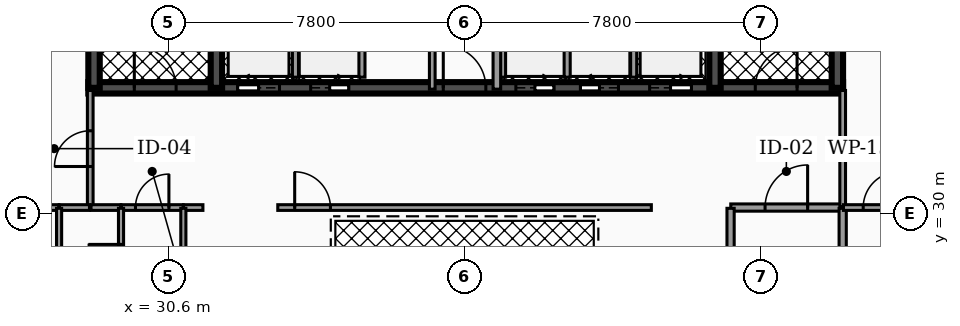
"""IFC4 building model, lengths in metres.
Left out: names, types, materials, properties, quantities, classifications, styles, units other than length and angle.
Written with IfcOpenShell. Run it as: python <this file> out.ifc"""

import sys

from ifc_helpers import new_model, si_unit, direction, frame, frame_2d, origin, place, context, subcontext, project, spatial, rectangle, extrude, element, fill, save


model = new_model("IFC4")
c1 = context("Model", 3, precision=1e-05, world=origin(), true_north=direction((0.0, 1.0)))
c2 = subcontext(c1, "Body", "Model", "MODEL_VIEW")
j1 = project(units=[si_unit("LENGTHUNIT", "METRE"), si_unit("PLANEANGLEUNIT", "RADIAN")], contexts=[c1])
p1 = place(None, origin())
s1 = spatial("IfcSite", under=j1, at=p1, CompositionType="ELEMENT")
p2 = place(p1, origin())
s2 = spatial("IfcBuilding", under=s1, at=p2, CompositionType="ELEMENT")
p3 = place(p2, frame((0.0, 0.0, 208.76)))
s3 = spatial("IfcBuildingStorey", under=s2, at=p3, CompositionType="ELEMENT", Elevation=208.76)
p4 = place(p3, frame((28.5, 33.3, 0.0), z_axis=(0.0, 0.0, 1.0), x_axis=(1.0, 0.0, 0.0)))
e1 = element("IfcWall", 1, at=p4, inside=s3, PredefinedType="SHEAR", context=c2, shape_type="SweptSolid", body=[
    extrude(rectangle(XDim=19.86, YDim=0.3, at=frame_2d((9.93, 0.0))), origin(), (0.0, 0.0, 1.0), 3.18),
])
p5 = place(p4, frame((3.93, 0.0, 0.0)))
e2 = element("IfcOpeningElement", 2, at=p5, cuts=e1, PredefinedType="OPENING", context=c2, shape_type="SweptSolid", body=[
    extrude(rectangle(XDim=1.1, YDim=2.15, at=frame_2d((0.55, 1.075))), frame((0.0, 0.16, 0.0), z_axis=(0.0, -1.0, 0.0), x_axis=(1.0, 0.0, 0.0)), (0.0, 0.0, 1.0), 0.32),
])
p6 = place(p4, frame((14.77, 0.0, 0.0)))
e3 = element("IfcOpeningElement", 3, at=p6, cuts=e1, PredefinedType="OPENING", context=c2, shape_type="SweptSolid", body=[
    extrude(rectangle(XDim=1.1, YDim=2.15, at=frame_2d((0.55, 1.075))), frame((0.0, 0.16, 0.0), z_axis=(0.0, -1.0, 0.0), x_axis=(1.0, 0.0, 0.0)), (0.0, 0.0, 1.0), 0.32),
])
p7 = place(p4, frame((11.25, 0.0, 0.0)))
e4 = element("IfcOpeningElement", 4, at=p7, cuts=e1, PredefinedType="OPENING", context=c2, shape_type="SweptSolid", body=[
    extrude(rectangle(XDim=1.0, YDim=2.1, at=frame_2d((0.5, 1.05))), frame((0.0, 0.16, 0.0), z_axis=(0.0, -1.0, 0.0), x_axis=(1.0, 0.0, 0.0)), (0.0, 0.0, 1.0), 0.32),
])
p8 = place(p4, frame((12.95, 0.0, 0.0)))
e5 = element("IfcOpeningElement", 5, at=p8, cuts=e1, PredefinedType="OPENING", context=c2, shape_type="SweptSolid", body=[
    extrude(rectangle(XDim=1.0, YDim=2.1, at=frame_2d((0.5, 1.05))), frame((0.0, 0.16, 0.0), z_axis=(0.0, -1.0, 0.0), x_axis=(1.0, 0.0, 0.0)), (0.0, 0.0, 1.0), 0.32),
])
p9 = place(p4, frame((5.85, 0.0, 0.0)))
e6 = element("IfcOpeningElement", 6, at=p9, cuts=e1, PredefinedType="OPENING", context=c2, shape_type="SweptSolid", body=[
    extrude(rectangle(XDim=1.0, YDim=2.1, at=frame_2d((0.5, 1.05))), frame((0.0, 0.16, 0.0), z_axis=(0.0, -1.0, 0.0), x_axis=(1.0, 0.0, 0.0)), (0.0, 0.0, 1.0), 0.32),
])
p10 = place(p4, frame((1.21, 0.0, 0.0)))
e7 = element("IfcOpeningElement", 7, at=p10, cuts=e1, PredefinedType="OPENING", context=c2, shape_type="SweptSolid", body=[
    extrude(rectangle(XDim=1.1, YDim=2.2, at=frame_2d((0.55, 1.1))), frame((0.0, 0.16, 0.0), z_axis=(0.0, -1.0, 0.0), x_axis=(1.0, 0.0, 0.0)), (0.0, 0.0, 1.0), 0.32),
])
p11 = place(p4, frame((9.34, 0.0, 0.0)))
e8 = element("IfcOpeningElement", 8, at=p11, cuts=e1, PredefinedType="OPENING", context=c2, shape_type="SweptSolid", body=[
    extrude(rectangle(XDim=1.12, YDim=2.05, at=frame_2d((0.56, 1.025))), frame((0.0, 0.16, 0.0), z_axis=(0.0, -1.0, 0.0), x_axis=(1.0, 0.0, 0.0)), (0.0, 0.0, 1.0), 0.32),
])
p12 = place(p4, frame((17.55, 0.0, 0.0)))
e9 = element("IfcOpeningElement", 9, at=p12, cuts=e1, PredefinedType="OPENING", context=c2, shape_type="SweptSolid", body=[
    extrude(rectangle(XDim=1.1, YDim=2.2, at=frame_2d((0.55, 1.1))), frame((0.0, 0.16, 0.0), z_axis=(0.0, -1.0, 0.0), x_axis=(1.0, 0.0, 0.0)), (0.0, 0.0, 1.0), 0.32),
])
for number, where, z_axis, x_axis in (
    (10, (28.65, 33.3, 0.0), (0.0, 0.0, 1.0), (0.0, 1.0, 0.0)),
    (11, (31.87, 33.3, 0.0), (0.0, 0.0, 1.0), (0.0, 1.0, 0.0)),
    (12, (44.99, 33.3, 0.0), (0.0, 0.0, 1.0), (0.0, 1.0, 0.0)),
    (13, (48.21, 33.3, 0.0), (0.0, 0.0, 1.0), (0.0, 1.0, 0.0)),
):
    element("IfcWall", number, at=place(p3, frame(where, z_axis=z_axis, x_axis=x_axis)), inside=s3, PredefinedType="SHEAR", context=c2, shape_type="SweptSolid", body=[
        extrude(rectangle(XDim=10.1, YDim=0.3, at=frame_2d((5.05, 0.0))), origin(), (0.0, 0.0, 1.0), 3.18),
    ])
for number, where, z_axis, x_axis in (
    (14, (33.95, 33.58, 0.0), (0.0, 0.0, 1.0), (0.0, 1.0, 0.0)),
    (15, (42.85, 33.58, 0.0), (0.0, 0.0, 1.0), (0.0, 1.0, 0.0)),
):
    element("IfcWall", number, at=place(p3, frame(where, z_axis=z_axis, x_axis=x_axis)), inside=s3, PredefinedType="SOLIDWALL", context=c2, shape_type="SweptSolid", body=[
        extrude(rectangle(XDim=2.45, YDim=0.16, at=frame_2d((1.225, 0.0))), origin(), (0.0, 0.0, 1.0), 3.18),
    ])
for number, where, z_axis, x_axis in (
    (16, (39.4, 33.58, 0.0), (0.0, 0.0, 1.0), (0.0, 1.0, 0.0)),
    (17, (41.1, 33.58, 0.0), (0.0, 0.0, 1.0), (0.0, 1.0, 0.0)),
    (18, (35.7, 33.58, 0.0), (0.0, 0.0, 1.0), (0.0, 1.0, 0.0)),
):
    element("IfcWall", number, at=place(p3, frame(where, z_axis=z_axis, x_axis=x_axis)), inside=s3, PredefinedType="SOLIDWALL", context=c2, shape_type="SweptSolid", body=[
        extrude(rectangle(XDim=2.25, YDim=0.16, at=frame_2d((1.125, 0.0))), origin(), (0.0, 0.0, 1.0), 3.18),
    ])
p13 = place(p3, frame((37.55, 33.265, 0.0), z_axis=(0.0, 0.0, 1.0), x_axis=(0.0, 1.0, 0.0)))
e19 = element("IfcWall", 19, at=p13, inside=s3, PredefinedType="PARTITIONING", context=c2, shape_type="SweptSolid", body=[
    extrude(rectangle(XDim=3.615, YDim=0.15, at=frame_2d((1.808, 0.0))), origin(), (0.0, 0.0, 1.0), 2.235),
])
p14 = place(p13, frame((1.337, 0.0, 0.0)))
e20 = element("IfcOpeningElement", 20, at=p14, cuts=e19, PredefinedType="OPENING", context=c2, shape_type="SweptSolid", body=[
    extrude(rectangle(XDim=0.94, YDim=2.05, at=frame_2d((0.47, 1.025))), frame((0.0, 0.085, 0.0), z_axis=(0.0, -1.0, 0.0), x_axis=(1.0, 0.0, 0.0)), (0.0, 0.0, 1.0), 0.17),
])
p15 = place(p3, frame((39.25, 33.265, 0.0), z_axis=(0.0, 0.0, 1.0), x_axis=(0.0, 1.0, 0.0)))
e21 = element("IfcWall", 21, at=p15, inside=s3, PredefinedType="PARTITIONING", context=c2, shape_type="SweptSolid", body=[
    extrude(rectangle(XDim=3.615, YDim=0.2, at=frame_2d((1.808, 0.0))), origin(), (0.0, 0.0, 1.0), 2.235),
])
p16 = place(p3, frame((45.405, 30.15, 0.0), z_axis=(0.0, 0.0, 1.0), x_axis=(1.0, 0.0, 0.0)))
e22 = element("IfcWall", 22, at=p16, inside=s3, PredefinedType="PARTITIONING", context=c2, shape_type="SweptSolid", body=[
    extrude(rectangle(XDim=2.925, YDim=0.19, at=frame_2d((1.462, 0.0))), origin(), (0.0, 0.0, 1.0), 2.235),
])
p17 = place(p16, frame((0.903, 0.0, 0.0)))
e23 = element("IfcOpeningElement", 23, at=p17, cuts=e22, PredefinedType="OPENING", context=c2, shape_type="SweptSolid", body=[
    extrude(rectangle(XDim=1.12, YDim=2.05, at=frame_2d((0.56, 1.025))), frame((0.0, 0.105, 0.0), z_axis=(0.0, -1.0, 0.0), x_axis=(1.0, 0.0, 0.0)), (0.0, 0.0, 1.0), 0.21),
])
p18 = place(p3, frame((28.55, 30.17, 0.0), z_axis=(0.0, 0.0, 1.0), x_axis=(0.0, 1.0, 0.0)))
e24 = element("IfcWall", 24, at=p18, inside=s3, PredefinedType="PARTITIONING", context=c2, shape_type="SweptSolid", body=[
    extrude(rectangle(XDim=3.06, YDim=0.15, at=frame_2d((1.53, 0.0))), origin(), (0.0, 0.0, 1.0), 2.235),
])
p19 = place(p18, frame((1.06, 0.0, 0.0)))
e25 = element("IfcOpeningElement", 25, at=p19, cuts=e24, PredefinedType="OPENING", context=c2, shape_type="SweptSolid", body=[
    extrude(rectangle(XDim=0.94, YDim=2.05, at=frame_2d((0.47, 1.025))), frame((0.0, 0.085, 0.0), z_axis=(0.0, -1.0, 0.0), x_axis=(1.0, 0.0, 0.0)), (0.0, 0.0, 1.0), 0.17),
])
p20 = place(p3, frame((48.35, 30.17, 0.0), z_axis=(0.0, 0.0, 1.0), x_axis=(0.0, 1.0, 0.0)))
e26 = element("IfcWall", 26, at=p20, inside=s3, PredefinedType="PARTITIONING", context=c2, shape_type="SweptSolid", body=[
    extrude(rectangle(XDim=3.06, YDim=0.15, at=frame_2d((1.53, 0.0))), origin(), (0.0, 0.0, 1.0), 2.235),
])
p21 = place(p3, frame((29.365, 30.15, 0.0), z_axis=(0.0, 0.0, 1.0), x_axis=(1.0, 0.0, 0.0)))
e27 = element("IfcWall", 27, at=p21, inside=s3, PredefinedType="PARTITIONING", context=c2, shape_type="SweptSolid", body=[
    extrude(rectangle(XDim=1.63, YDim=0.15, at=frame_2d((0.815, 0.0))), origin(), (0.0, 0.0, 1.0), 2.235),
])
p22 = place(p21, frame((0.375, 0.0, 0.0)))
e28 = element("IfcOpeningElement", 28, at=p22, cuts=e27, PredefinedType="OPENING", context=c2, shape_type="SweptSolid", body=[
    extrude(rectangle(XDim=0.88, YDim=2.05, at=frame_2d((0.44, 1.025))), frame((0.0, 0.085, 0.0), z_axis=(0.0, -1.0, 0.0), x_axis=(1.0, 0.0, 0.0)), (0.0, 0.0, 1.0), 0.17),
])
p23 = place(p3, frame((28.57, 30.15, 0.0), z_axis=(0.0, 0.0, 1.0), x_axis=(1.0, 0.0, 0.0)))
e29 = element("IfcWall", 29, at=p23, inside=s3, PredefinedType="PARTITIONING", context=c2, shape_type="SweptSolid", body=[
    extrude(rectangle(XDim=0.785, YDim=0.15, at=frame_2d((0.393, 0.0))), origin(), (0.0, 0.0, 1.0), 2.235),
])
p24 = place(p3, frame((33.485, 30.15, 0.0), z_axis=(0.0, 0.0, 1.0), x_axis=(1.0, 0.0, 0.0)))
e30 = element("IfcWall", 30, at=p24, inside=s3, PredefinedType="PARTITIONING", context=c2, shape_type="SweptSolid", body=[
    extrude(rectangle(XDim=9.83, YDim=0.15, at=frame_2d((4.915, 0.0))), origin(), (0.0, 0.0, 1.0), 2.235),
])
p25 = place(p24, frame((0.445, 0.0, 0.0)))
e31 = element("IfcOpeningElement", 31, at=p25, cuts=e30, PredefinedType="OPENING", context=c2, shape_type="SweptSolid", body=[
    extrude(rectangle(XDim=0.94, YDim=2.05, at=frame_2d((0.47, 1.025))), frame((0.0, 0.085, 0.0), z_axis=(0.0, -1.0, 0.0), x_axis=(1.0, 0.0, 0.0)), (0.0, 0.0, 1.0), 0.17),
])
p26 = place(p3, frame((31.005, 30.15, 0.0), z_axis=(0.0, 0.0, 1.0), x_axis=(1.0, 0.0, 0.0)))
e32 = element("IfcWall", 32, at=p26, inside=s3, PredefinedType="PARTITIONING", context=c2, shape_type="SweptSolid", body=[
    extrude(rectangle(XDim=0.51, YDim=0.15, at=frame_2d((0.255, 0.0))), origin(), (0.0, 0.0, 1.0), 2.235),
])
for number, where, z_axis, x_axis in (
    (33, (45.4, 27.37, 0.0), (0.0, 0.0, 1.0), (0.0, 1.0, 0.0)),
    (34, (48.35, 27.37, 0.0), (0.0, 0.0, 1.0), (0.0, 1.0, 0.0)),
):
    element("IfcWall", number, at=place(p3, frame(where, z_axis=z_axis, x_axis=x_axis)), inside=s3, PredefinedType="PARTITIONING", context=c2, shape_type="SweptSolid", body=[
        extrude(rectangle(XDim=2.76, YDim=0.19, at=frame_2d((1.38, 0.0))), origin(), (0.0, 0.0, 1.0), 2.235),
    ])
p27 = place(p3, frame((26.55, 30.15, 0.0), z_axis=(0.0, 0.0, 1.0), x_axis=(1.0, 0.0, 0.0)))
e35 = element("IfcWall", 35, at=p27, inside=s3, PredefinedType="PARTITIONING", context=c2, shape_type="SweptSolid", body=[
    extrude(rectangle(XDim=1.175, YDim=0.15, at=frame_2d((0.587, 0.0))), origin(), (0.0, 0.0, 1.0), 2.235),
])
p28 = place(p3, frame((27.735, 30.15, 0.0), z_axis=(0.0, 0.0, 1.0), x_axis=(1.0, 0.0, 0.0)))
e36 = element("IfcWall", 36, at=p28, inside=s3, PredefinedType="PARTITIONING", context=c2, shape_type="SweptSolid", body=[
    extrude(rectangle(XDim=0.795, YDim=0.15, at=frame_2d((0.397, 0.0))), origin(), (0.0, 0.0, 1.0), 2.235),
])
p29 = place(p3, frame((48.37, 30.15, 0.0), z_axis=(0.0, 0.0, 1.0), x_axis=(1.0, 0.0, 0.0)))
e37 = element("IfcWall", 37, at=p29, inside=s3, PredefinedType="PARTITIONING", context=c2, shape_type="SweptSolid", body=[
    extrude(rectangle(XDim=1.98, YDim=0.15, at=frame_2d((0.99, 0.0))), origin(), (0.0, 0.0, 1.0), 2.235),
])
p30 = place(p29, frame((0.52, 0.0, 0.0)))
e38 = element("IfcOpeningElement", 38, at=p30, cuts=e37, PredefinedType="OPENING", context=c2, shape_type="SweptSolid", body=[
    extrude(rectangle(XDim=0.94, YDim=2.05, at=frame_2d((0.47, 1.025))), frame((0.0, 0.085, 0.0), z_axis=(0.0, -1.0, 0.0), x_axis=(1.0, 0.0, 0.0)), (0.0, 0.0, 1.0), 0.17),
])
p31 = place(p3, frame((29.36, 27.37, 0.0), z_axis=(0.0, 0.0, 1.0), x_axis=(0.0, 1.0, 0.0)))
e39 = element("IfcWall", 39, at=p31, inside=s3, PredefinedType="PARTITIONING", context=c2, shape_type="SweptSolid", body=[
    extrude(rectangle(XDim=2.76, YDim=0.135, at=frame_2d((1.38, 0.0))), origin(), (0.0, 0.0, 1.0), 2.235),
])
p32 = place(p31, frame((0.95, 0.0, 0.0)))
e40 = element("IfcOpeningElement", 40, at=p32, cuts=e39, PredefinedType="OPENING", context=c2, shape_type="SweptSolid", body=[
    extrude(rectangle(XDim=0.86, YDim=2.05, at=frame_2d((0.43, 1.025))), frame((0.0, 0.077, 0.0), z_axis=(0.0, -1.0, 0.0), x_axis=(1.0, 0.0, 0.0)), (0.0, 0.0, 1.0), 0.155),
])
for number, where, z_axis, x_axis in (
    (41, (31.0, 27.37, 0.0), (0.0, 0.0, 1.0), (0.0, 1.0, 0.0)),
    (42, (27.73, 27.37, 0.0), (0.0, 0.0, 1.0), (0.0, 1.0, 0.0)),
):
    element("IfcWall", number, at=place(p3, frame(where, z_axis=z_axis, x_axis=x_axis)), inside=s3, PredefinedType="PARTITIONING", context=c2, shape_type="SweptSolid", body=[
        extrude(rectangle(XDim=2.76, YDim=0.135, at=frame_2d((1.38, 0.0))), origin(), (0.0, 0.0, 1.0), 2.235),
    ])
p33 = place(p5, origin())
e43 = element("IfcDoor", 43, at=p33, inside=s3, OperationType="SLIDING_TO_LEFT", PredefinedType="DOOR", context=c2, shape_type="SweptSolid", body=[
    extrude(rectangle(XDim=1.1, YDim=2.15, at=frame_2d((0.55, 1.075))), frame((0.0, 0.025, 0.0), z_axis=(0.0, -1.0, 0.0), x_axis=(1.0, 0.0, 0.0)), (0.0, 0.0, 1.0), 0.05),
])
fill(e2, e43)
p34 = place(p6, origin())
e44 = element("IfcDoor", 44, at=p34, inside=s3, OperationType="SLIDING_TO_RIGHT", PredefinedType="DOOR", context=c2, shape_type="SweptSolid", body=[
    extrude(rectangle(XDim=1.1, YDim=2.15, at=frame_2d((0.55, 1.075))), frame((0.0, 0.025, 0.0), z_axis=(0.0, -1.0, 0.0), x_axis=(1.0, 0.0, 0.0)), (0.0, 0.0, 1.0), 0.05),
])
fill(e3, e44)
p35 = place(p7, origin())
e45 = element("IfcDoor", 45, at=p35, inside=s3, OperationType="SLIDING_TO_RIGHT", PredefinedType="DOOR", context=c2, shape_type="SweptSolid", body=[
    extrude(rectangle(XDim=1.0, YDim=2.1, at=frame_2d((0.5, 1.05))), frame((0.0, 0.025, 0.0), z_axis=(0.0, -1.0, 0.0), x_axis=(1.0, 0.0, 0.0)), (0.0, 0.0, 1.0), 0.05),
])
fill(e4, e45)
p36 = place(p8, origin())
e46 = element("IfcDoor", 46, at=p36, inside=s3, OperationType="SLIDING_TO_LEFT", PredefinedType="DOOR", context=c2, shape_type="SweptSolid", body=[
    extrude(rectangle(XDim=1.0, YDim=2.1, at=frame_2d((0.5, 1.05))), frame((0.0, 0.025, 0.0), z_axis=(0.0, -1.0, 0.0), x_axis=(1.0, 0.0, 0.0)), (0.0, 0.0, 1.0), 0.05),
])
fill(e5, e46)
p37 = place(p9, origin())
e47 = element("IfcDoor", 47, at=p37, inside=s3, OperationType="SLIDING_TO_RIGHT", PredefinedType="DOOR", context=c2, shape_type="SweptSolid", body=[
    extrude(rectangle(XDim=1.0, YDim=2.1, at=frame_2d((0.5, 1.05))), frame((0.0, 0.025, 0.0), z_axis=(0.0, -1.0, 0.0), x_axis=(1.0, 0.0, 0.0)), (0.0, 0.0, 1.0), 0.05),
])
fill(e6, e47)
p38 = place(p10, origin())
e48 = element("IfcDoor", 48, at=p38, inside=s3, OperationType="SINGLE_SWING_LEFT", PredefinedType="DOOR", context=c2, shape_type="SweptSolid", body=[
    extrude(rectangle(XDim=1.1, YDim=2.2, at=frame_2d((0.55, 1.1))), frame((0.0, 0.025, 0.0), z_axis=(0.0, -1.0, 0.0), x_axis=(1.0, 0.0, 0.0)), (0.0, 0.0, 1.0), 0.05),
])
fill(e7, e48)
p39 = place(p11, origin())
e49 = element("IfcDoor", 49, at=p39, inside=s3, OperationType="SINGLE_SWING_LEFT", PredefinedType="DOOR", context=c2, shape_type="SweptSolid", body=[
    extrude(rectangle(XDim=1.12, YDim=2.05, at=frame_2d((0.56, 1.025))), frame((0.0, 0.025, 0.0), z_axis=(0.0, -1.0, 0.0), x_axis=(1.0, 0.0, 0.0)), (0.0, 0.0, 1.0), 0.05),
])
fill(e8, e49)
p40 = place(p12, origin())
e50 = element("IfcDoor", 50, at=p40, inside=s3, OperationType="SINGLE_SWING_RIGHT", PredefinedType="DOOR", context=c2, shape_type="SweptSolid", body=[
    extrude(rectangle(XDim=1.1, YDim=2.2, at=frame_2d((0.55, 1.1))), frame((0.0, 0.025, 0.0), z_axis=(0.0, -1.0, 0.0), x_axis=(1.0, 0.0, 0.0)), (0.0, 0.0, 1.0), 0.05),
])
fill(e9, e50)
p41 = place(p17, origin())
e51 = element("IfcDoor", 51, at=p41, inside=s3, OperationType="SINGLE_SWING_RIGHT", PredefinedType="DOOR", context=c2, shape_type="SweptSolid", body=[
    extrude(rectangle(XDim=1.12, YDim=2.05, at=frame_2d((0.56, 1.025))), frame((0.0, 0.025, 0.0), z_axis=(0.0, -1.0, 0.0), x_axis=(1.0, 0.0, 0.0)), (0.0, 0.0, 1.0), 0.05),
])
fill(e23, e51)
p42 = place(p19, origin())
e52 = element("IfcDoor", 52, at=p42, inside=s3, OperationType="SINGLE_SWING_LEFT", PredefinedType="DOOR", context=c2, shape_type="SweptSolid", body=[
    extrude(rectangle(XDim=0.94, YDim=2.05, at=frame_2d((0.47, 1.025))), frame((0.0, 0.025, 0.0), z_axis=(0.0, -1.0, 0.0), x_axis=(1.0, 0.0, 0.0)), (0.0, 0.0, 1.0), 0.05),
])
fill(e25, e52)
p43 = place(p22, origin())
e53 = element("IfcDoor", 53, at=p43, inside=s3, OperationType="SINGLE_SWING_RIGHT", PredefinedType="DOOR", context=c2, shape_type="SweptSolid", body=[
    extrude(rectangle(XDim=0.88, YDim=2.05, at=frame_2d((0.44, 1.025))), frame((0.0, 0.025, 0.0), z_axis=(0.0, -1.0, 0.0), x_axis=(1.0, 0.0, 0.0)), (0.0, 0.0, 1.0), 0.05),
])
fill(e28, e53)
p44 = place(p25, origin())
e54 = element("IfcDoor", 54, at=p44, inside=s3, OperationType="SINGLE_SWING_LEFT", PredefinedType="DOOR", context=c2, shape_type="SweptSolid", body=[
    extrude(rectangle(XDim=0.94, YDim=2.05, at=frame_2d((0.47, 1.025))), frame((0.0, 0.025, 0.0), z_axis=(0.0, -1.0, 0.0), x_axis=(1.0, 0.0, 0.0)), (0.0, 0.0, 1.0), 0.05),
])
fill(e31, e54)
p45 = place(p30, origin())
e55 = element("IfcDoor", 55, at=p45, inside=s3, OperationType="SINGLE_SWING_RIGHT", PredefinedType="DOOR", context=c2, shape_type="SweptSolid", body=[
    extrude(rectangle(XDim=0.94, YDim=2.05, at=frame_2d((0.47, 1.025))), frame((0.0, 0.025, 0.0), z_axis=(0.0, -1.0, 0.0), x_axis=(1.0, 0.0, 0.0)), (0.0, 0.0, 1.0), 0.05),
])
fill(e38, e55)
p46 = place(p32, origin())
e56 = element("IfcDoor", 56, at=p46, inside=s3, OperationType="SINGLE_SWING_RIGHT", PredefinedType="DOOR", context=c2, shape_type="SweptSolid", body=[
    extrude(rectangle(XDim=0.86, YDim=2.05, at=frame_2d((0.43, 1.025))), frame((0.0, 0.025, 0.0), z_axis=(0.0, -1.0, 0.0), x_axis=(1.0, 0.0, 0.0)), (0.0, 0.0, 1.0), 0.05),
])
fill(e40, e56)
save(model, sys.argv[1])
